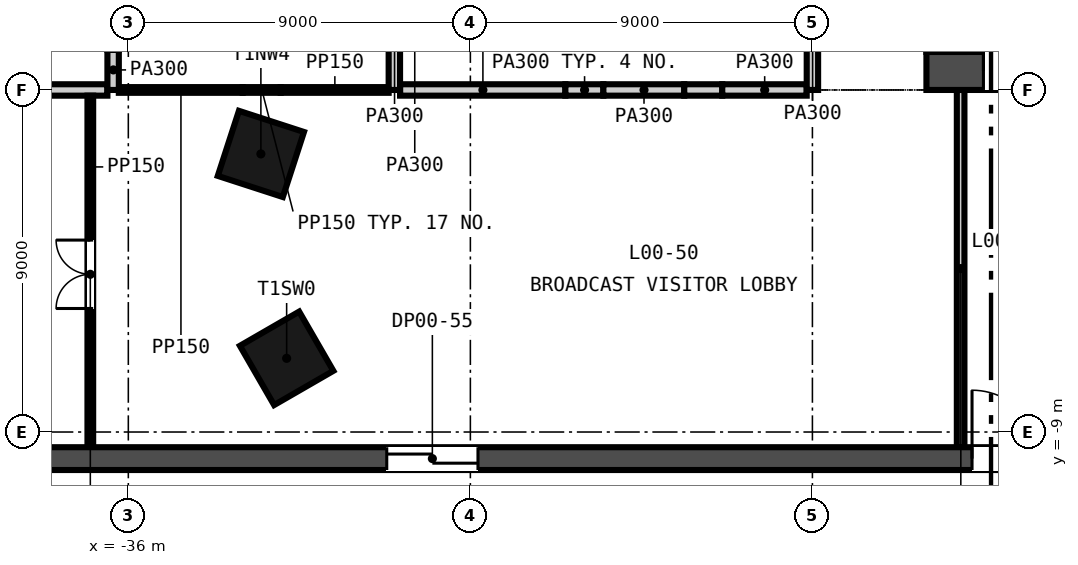
"""IFC4 building model, lengths in metres.
Left out: names, types, materials, properties, quantities, classifications, styles, units other than length and angle.
Written with IfcOpenShell. Run it as: python <this file> out.ifc"""

import sys

from ifc_helpers import new_model, si_unit, direction, frame, frame_2d, origin, origin_2d, place, context, subcontext, project, spatial, rectangle, extrude, element, fill, save


model = new_model("IFC4")
c1 = context("Model", 3, precision=1e-05, world=origin(), true_north=direction((0.0, 1.0)))
c2 = subcontext(c1, "Body", "Model", "MODEL_VIEW")
j1 = project(units=[si_unit("LENGTHUNIT", "METRE"), si_unit("PLANEANGLEUNIT", "RADIAN")], contexts=[c1])
p1 = place(None, origin())
s1 = spatial("IfcSite", under=j1, at=p1, CompositionType="ELEMENT")
p2 = place(p1, origin())
s2 = spatial("IfcBuilding", under=s1, at=p2, CompositionType="ELEMENT")
p3 = place(p2, origin())
s3 = spatial("IfcBuildingStorey", under=s2, at=p3, CompositionType="ELEMENT", Elevation=0.0)
p4 = place(p3, frame((-15.0, 0.5, -2.2), z_axis=(0.0, 0.0, 1.0), x_axis=(1.0, 0.0, 0.0)))
e1 = element("IfcWall", 1, at=p4, inside=s3, PredefinedType="SOLIDWALL", context=c2, shape_type="SweptSolid", body=[
    extrude(rectangle(XDim=30.0, YDim=1.0, at=frame_2d((15.0, 0.0))), origin(), (0.0, 0.0, 1.0), 10.8),
])
p5 = place(p4, frame((5.8, 0.0, 2.2)))
e2 = element("IfcOpeningElement", 2, at=p5, cuts=e1, PredefinedType="OPENING", context=c2, shape_type="SweptSolid", body=[
    extrude(rectangle(XDim=2.4, YDim=2.4, at=frame_2d((1.2, 1.2))), frame((0.0, 0.51, 0.0), z_axis=(0.0, -1.0, 0.0), x_axis=(1.0, 0.0, 0.0)), (0.0, 0.0, 1.0), 1.02),
])
p6 = place(p4, frame((13.8, 0.0, 2.2)))
e3 = element("IfcOpeningElement", 3, at=p6, cuts=e1, PredefinedType="OPENING", context=c2, shape_type="SweptSolid", body=[
    extrude(rectangle(XDim=2.4, YDim=2.4, at=frame_2d((1.2, 1.2))), frame((0.0, 0.51, 0.0), z_axis=(0.0, -1.0, 0.0), x_axis=(1.0, 0.0, 0.0)), (0.0, 0.0, 1.0), 1.02),
])
p7 = place(p4, frame((21.8, 0.0, 2.2)))
e4 = element("IfcOpeningElement", 4, at=p7, cuts=e1, PredefinedType="OPENING", context=c2, shape_type="SweptSolid", body=[
    extrude(rectangle(XDim=2.4, YDim=2.4, at=frame_2d((1.2, 1.2))), frame((0.0, 0.51, 0.0), z_axis=(0.0, -1.0, 0.0), x_axis=(1.0, 0.0, 0.0)), (0.0, 0.0, 1.0), 1.02),
])
p8 = place(p4, frame((1.5, 0.0, 2.2)))
e5 = element("IfcOpeningElement", 5, at=p8, cuts=e1, PredefinedType="OPENING", context=c2, shape_type="SweptSolid", body=[
    extrude(rectangle(XDim=1.2, YDim=2.1, at=frame_2d((0.6, 1.05))), frame((0.0, 0.51, 0.0), z_axis=(0.0, -1.0, 0.0), x_axis=(1.0, 0.0, 0.0)), (0.0, 0.0, 1.0), 1.02),
])
p9 = place(p4, frame((27.3, 0.0, 2.2)))
e6 = element("IfcOpeningElement", 6, at=p9, cuts=e1, PredefinedType="OPENING", context=c2, shape_type="SweptSolid", body=[
    extrude(rectangle(XDim=1.2, YDim=2.1, at=frame_2d((0.6, 1.05))), frame((0.0, 0.51, 0.0), z_axis=(0.0, -1.0, 0.0), x_axis=(1.0, 0.0, 0.0)), (0.0, 0.0, 1.0), 1.02),
])
for number, where, z_axis, x_axis in (
    (7, (-32.512, -1.683, -0.3), (0.0, 0.0, 1.0), (-0.309, -0.951, 0.0)),
    (8, (-31.834, -7.061, -0.3), (0.0, 0.0, 1.0), (0.5, -0.866, 0.0)),
):
    element("IfcColumn", number, at=place(p3, frame(where, z_axis=z_axis, x_axis=x_axis)), inside=s3, PredefinedType="COLUMN", context=c2, shape_type="SweptSolid", body=[
        extrude(rectangle(XDim=1.8, YDim=1.8, at=origin_2d()), origin(), (0.0, 0.0, 1.0), 8.9),
    ])
p10 = place(p3, frame((-52.0, -9.7, -0.3), z_axis=(0.0, 0.0, 1.0), x_axis=(1.0, 0.0, 0.0)))
e9 = element("IfcWall", 9, at=p10, inside=s3, PredefinedType="SOLIDWALL", context=c2, shape_type="SweptSolid", body=[
    extrude(rectangle(XDim=104.0, YDim=0.6, at=frame_2d((52.0, 0.0))), origin(), (0.0, 0.0, 1.0), 8.9),
])
p11 = place(p10, frame((67.4, 0.0, 0.3)))
e10 = element("IfcOpeningElement", 10, at=p11, cuts=e9, PredefinedType="OPENING", context=c2, shape_type="SweptSolid", body=[
    extrude(rectangle(XDim=1.2, YDim=2.1, at=frame_2d((0.6, 1.05))), frame((0.0, 0.31, 0.0), z_axis=(0.0, -1.0, 0.0), x_axis=(1.0, 0.0, 0.0)), (0.0, 0.0, 1.0), 0.62),
])
p12 = place(p10, frame((38.2, 0.0, 0.3)))
e11 = element("IfcOpeningElement", 11, at=p12, cuts=e9, PredefinedType="OPENING", context=c2, shape_type="SweptSolid", body=[
    extrude(rectangle(XDim=1.8, YDim=2.4, at=frame_2d((0.9, 1.2))), frame((0.0, 0.31, 0.0), z_axis=(0.0, -1.0, 0.0), x_axis=(1.0, 0.0, 0.0)), (0.0, 0.0, 1.0), 0.62),
])
p13 = place(p10, frame((64.0, 0.0, 0.3)))
e12 = element("IfcOpeningElement", 12, at=p13, cuts=e9, PredefinedType="OPENING", context=c2, shape_type="SweptSolid", body=[
    extrude(rectangle(XDim=1.8, YDim=2.4, at=frame_2d((0.9, 1.2))), frame((0.0, 0.31, 0.0), z_axis=(0.0, -1.0, 0.0), x_axis=(1.0, 0.0, 0.0)), (0.0, 0.0, 1.0), 0.62),
])
p14 = place(p10, frame((41.8, 0.0, 0.3)))
e13 = element("IfcOpeningElement", 13, at=p14, cuts=e9, PredefinedType="OPENING", context=c2, shape_type="SweptSolid", body=[
    extrude(rectangle(XDim=2.4, YDim=2.4, at=frame_2d((1.2, 1.2))), frame((0.0, 0.31, 0.0), z_axis=(0.0, -1.0, 0.0), x_axis=(1.0, 0.0, 0.0)), (0.0, 0.0, 1.0), 0.62),
])
p15 = place(p10, frame((59.8, 0.0, 0.3)))
e14 = element("IfcOpeningElement", 14, at=p15, cuts=e9, PredefinedType="OPENING", context=c2, shape_type="SweptSolid", body=[
    extrude(rectangle(XDim=2.4, YDim=2.4, at=frame_2d((1.2, 1.2))), frame((0.0, 0.31, 0.0), z_axis=(0.0, -1.0, 0.0), x_axis=(1.0, 0.0, 0.0)), (0.0, 0.0, 1.0), 0.62),
])
p16 = place(p10, frame((22.8, 0.0, 0.3)))
e15 = element("IfcOpeningElement", 15, at=p16, cuts=e9, PredefinedType="OPENING", context=c2, shape_type="SweptSolid", body=[
    extrude(rectangle(XDim=2.4, YDim=2.4, at=frame_2d((1.2, 1.2))), frame((0.0, 0.31, 0.0), z_axis=(0.0, -1.0, 0.0), x_axis=(1.0, 0.0, 0.0)), (0.0, 0.0, 1.0), 0.62),
])
p17 = place(p10, frame((78.8, 0.0, 0.3)))
e16 = element("IfcOpeningElement", 16, at=p17, cuts=e9, PredefinedType="OPENING", context=c2, shape_type="SweptSolid", body=[
    extrude(rectangle(XDim=2.4, YDim=2.4, at=frame_2d((1.2, 1.2))), frame((0.0, 0.31, 0.0), z_axis=(0.0, -1.0, 0.0), x_axis=(1.0, 0.0, 0.0)), (0.0, 0.0, 1.0), 0.62),
])
p18 = place(p10, frame((7.1, 0.0, 0.3)))
e17 = element("IfcOpeningElement", 17, at=p18, cuts=e9, PredefinedType="OPENING", context=c2, shape_type="SweptSolid", body=[
    extrude(rectangle(XDim=1.8, YDim=2.4, at=frame_2d((0.9, 1.2))), frame((0.0, 0.31, 0.0), z_axis=(0.0, -1.0, 0.0), x_axis=(1.0, 0.0, 0.0)), (0.0, 0.0, 1.0), 0.62),
])
p19 = place(p10, frame((95.1, 0.0, 0.3)))
e18 = element("IfcOpeningElement", 18, at=p19, cuts=e9, PredefinedType="OPENING", context=c2, shape_type="SweptSolid", body=[
    extrude(rectangle(XDim=1.8, YDim=2.4, at=frame_2d((0.9, 1.2))), frame((0.0, 0.31, 0.0), z_axis=(0.0, -1.0, 0.0), x_axis=(1.0, 0.0, 0.0)), (0.0, 0.0, 1.0), 0.62),
])
p20 = place(p3, frame((-51.0, 0.0, 0.0), z_axis=(0.0, 0.0, 1.0), x_axis=(1.0, 0.0, 0.0)))
e19 = element("IfcWall", 19, at=p20, inside=s3, PredefinedType="PARTITIONING", context=c2, shape_type="SweptSolid", body=[
    extrude(rectangle(XDim=14.45, YDim=0.3, at=frame_2d((7.225, 0.0))), origin(), (0.0, 0.0, 1.0), 8.6),
])
p21 = place(p3, frame((-36.25, 0.0, 0.0), z_axis=(0.0, 0.0, 1.0), x_axis=(1.0, 0.0, 0.0)))
e20 = element("IfcWall", 20, at=p21, inside=s3, PredefinedType="PARTITIONING", context=c2, shape_type="SweptSolid", body=[
    extrude(rectangle(XDim=3.259, YDim=0.15, at=frame_2d((1.629, 0.0))), origin(), (0.0, 0.0, 1.0), 8.6),
])
p22 = place(p3, frame((-32.991, 0.0, 0.0), z_axis=(0.0, 0.0, 1.0), x_axis=(1.0, 0.0, 0.0)))
e21 = element("IfcWall", 21, at=p22, inside=s3, PredefinedType="PARTITIONING", context=c2, shape_type="SweptSolid", body=[
    extrude(rectangle(XDim=1.0, YDim=0.15, at=frame_2d((0.5, 0.0))), origin(), (0.0, 0.0, 1.0), 7.6),
])
p23 = place(p3, frame((-31.991, 0.0, 0.0), z_axis=(0.0, 0.0, 1.0), x_axis=(1.0, 0.0, 0.0)))
e22 = element("IfcWall", 22, at=p23, inside=s3, PredefinedType="PARTITIONING", context=c2, shape_type="SweptSolid", body=[
    extrude(rectangle(XDim=2.841, YDim=0.15, at=frame_2d((1.42, 0.0))), origin(), (0.0, 0.0, 1.0), 8.6),
])
p24 = place(p3, frame((-28.85, 0.0, 0.0), z_axis=(0.0, 0.0, 1.0), x_axis=(1.0, 0.0, 0.0)))
e23 = element("IfcWall", 23, at=p24, inside=s3, PredefinedType="PARTITIONING", context=c2, shape_type="SweptSolid", body=[
    extrude(rectangle(XDim=4.35, YDim=0.3, at=frame_2d((2.175, 0.0))), origin(), (0.0, 0.0, 1.0), 8.6),
])
p25 = place(p3, frame((-24.5, 0.0, 0.0), z_axis=(0.0, 0.0, 1.0), x_axis=(1.0, 0.0, 0.0)))
e24 = element("IfcWall", 24, at=p25, inside=s3, PredefinedType="PARTITIONING", context=c2, shape_type="SweptSolid", body=[
    extrude(rectangle(XDim=1.0, YDim=0.3, at=frame_2d((0.5, 0.0))), origin(), (0.0, 0.0, 1.0), 7.765),
])
p26 = place(p3, frame((-23.5, 0.0, 0.0), z_axis=(0.0, 0.0, 1.0), x_axis=(1.0, 0.0, 0.0)))
e25 = element("IfcWall", 25, at=p26, inside=s3, PredefinedType="PARTITIONING", context=c2, shape_type="SweptSolid", body=[
    extrude(rectangle(XDim=2.128, YDim=0.3, at=frame_2d((1.064, 0.0))), origin(), (0.0, 0.0, 1.0), 8.6),
])
p27 = place(p3, frame((-21.372, 0.0, 0.0), z_axis=(0.0, 0.0, 1.0), x_axis=(1.0, 0.0, 0.0)))
e26 = element("IfcWall", 26, at=p27, inside=s3, PredefinedType="PARTITIONING", context=c2, shape_type="SweptSolid", body=[
    extrude(rectangle(XDim=1.0, YDim=0.3, at=frame_2d((0.5, 0.0))), origin(), (0.0, 0.0, 1.0), 7.765),
])
p28 = place(p3, frame((-20.372, 0.0, 0.0), z_axis=(0.0, 0.0, 1.0), x_axis=(1.0, 0.0, 0.0)))
e27 = element("IfcWall", 27, at=p28, inside=s3, PredefinedType="PARTITIONING", context=c2, shape_type="SweptSolid", body=[
    extrude(rectangle(XDim=2.222, YDim=0.3, at=frame_2d((1.111, 0.0))), origin(), (0.0, 0.0, 1.0), 8.6),
])
p29 = place(p3, frame((-37.0, -9.4, 0.0), z_axis=(0.0, 0.0, 1.0), x_axis=(0.0, 1.0, 0.0)))
e28 = element("IfcWall", 28, at=p29, inside=s3, PredefinedType="PARTITIONING", context=c2, shape_type="SweptSolid", body=[
    extrude(rectangle(XDim=9.25, YDim=0.15, at=frame_2d((4.625, 0.0))), origin(), (0.0, 0.0, 1.0), 8.6),
])
p30 = place(p29, frame((3.65, 0.0, 0.0)))
e29 = element("IfcOpeningElement", 29, at=p30, cuts=e28, PredefinedType="OPENING", context=c2, shape_type="SweptSolid", body=[
    extrude(rectangle(XDim=1.8, YDim=2.4, at=frame_2d((0.9, 1.2))), frame((0.0, 0.085, 0.0), z_axis=(0.0, -1.0, 0.0), x_axis=(1.0, 0.0, 0.0)), (0.0, 0.0, 1.0), 0.17),
])
p31 = place(p3, frame((-36.4, 0.0, 0.0), z_axis=(0.0, 0.0, 1.0), x_axis=(0.0, 1.0, 0.0)))
e30 = element("IfcWall", 30, at=p31, inside=s3, PredefinedType="PARTITIONING", context=c2, shape_type="SweptSolid", body=[
    extrude(rectangle(XDim=1.055, YDim=0.3, at=frame_2d((0.527, 0.0))), origin(), (0.0, 0.0, 1.0), 7.698),
])
p32 = place(p3, frame((-29.0, 0.0, 0.0), z_axis=(0.0, 0.0, 1.0), x_axis=(0.0, 1.0, 0.0)))
e31 = element("IfcWall", 31, at=p32, inside=s3, PredefinedType="PARTITIONING", context=c2, shape_type="SweptSolid", body=[
    extrude(rectangle(XDim=5.752, YDim=0.3, at=frame_2d((2.876, 0.0))), origin(), (0.0, 0.0, 1.0), 8.6),
])
p33 = place(p3, frame((-18.0, 0.0, 0.0), z_axis=(0.0, 0.0, 1.0), x_axis=(0.0, 1.0, 0.0)))
e32 = element("IfcWall", 32, at=p33, inside=s3, PredefinedType="PARTITIONING", context=c2, shape_type="SweptSolid", body=[
    extrude(rectangle(XDim=7.0, YDim=0.3, at=frame_2d((3.5, 0.0))), origin(), (0.0, 0.0, 1.0), 8.6),
])
p34 = place(p33, frame((2.4, 0.0, 0.0)))
e33 = element("IfcOpeningElement", 33, at=p34, cuts=e32, PredefinedType="OPENING", context=c2, shape_type="SweptSolid", body=[
    extrude(rectangle(XDim=2.4, YDim=2.4, at=frame_2d((1.2, 1.2))), frame((0.0, 0.16, 0.0), z_axis=(0.0, -1.0, 0.0), x_axis=(1.0, 0.0, 0.0)), (0.0, 0.0, 1.0), 0.32),
])
p35 = place(p3, frame((-14.1, -9.4, 0.0), z_axis=(0.0, 0.0, 1.0), x_axis=(0.0, 1.0, 0.0)))
e34 = element("IfcWall", 34, at=p35, inside=s3, PredefinedType="PARTITIONING", context=c2, shape_type="SweptSolid", body=[
    extrude(rectangle(XDim=9.4, YDim=0.2, at=frame_2d((4.7, 0.0))), origin(), (0.0, 0.0, 1.0), 8.6),
])
p36 = place(p8, origin())
e35 = element("IfcDoor", 35, at=p36, inside=s3, OperationType="SINGLE_SWING_LEFT", PredefinedType="DOOR", context=c2, shape_type="SweptSolid", body=[
    extrude(rectangle(XDim=1.2, YDim=2.1, at=frame_2d((0.6, 1.05))), frame((0.0, 0.025, 0.0), z_axis=(0.0, -1.0, 0.0), x_axis=(1.0, 0.0, 0.0)), (0.0, 0.0, 1.0), 0.05),
])
fill(e5, e35)
p37 = place(p30, origin())
e36 = element("IfcDoor", 36, at=p37, inside=s3, OperationType="SINGLE_SWING_LEFT", PredefinedType="DOOR", context=c2, shape_type="SweptSolid", body=[
    extrude(rectangle(XDim=1.8, YDim=2.4, at=frame_2d((0.9, 1.2))), frame((0.0, 0.025, 0.0), z_axis=(0.0, -1.0, 0.0), x_axis=(1.0, 0.0, 0.0)), (0.0, 0.0, 1.0), 0.05),
])
fill(e29, e36)
p38 = place(p12, frame((1.8, 0.0, 0.0), z_axis=(0.0, 0.0, 1.0), x_axis=(-1.0, 0.0, 0.0)))
e37 = element("IfcDoor", 37, at=p38, inside=s3, OperationType="SINGLE_SWING_LEFT", PredefinedType="DOOR", context=c2, shape_type="SweptSolid", body=[
    extrude(rectangle(XDim=1.8, YDim=2.4, at=frame_2d((0.9, 1.2))), frame((0.0, 0.025, 0.0), z_axis=(0.0, -1.0, 0.0), x_axis=(1.0, 0.0, 0.0)), (0.0, 0.0, 1.0), 0.05),
])
fill(e11, e37)
p39 = place(p16, frame((2.4, 0.0, 0.0), z_axis=(0.0, 0.0, 1.0), x_axis=(-1.0, 0.0, 0.0)))
e38 = element("IfcDoor", 38, at=p39, inside=s3, OperationType="SINGLE_SWING_LEFT", PredefinedType="DOOR", context=c2, shape_type="SweptSolid", body=[
    extrude(rectangle(XDim=2.4, YDim=2.4, at=frame_2d((1.2, 1.2))), frame((0.0, 0.025, 0.0), z_axis=(0.0, -1.0, 0.0), x_axis=(1.0, 0.0, 0.0)), (0.0, 0.0, 1.0), 0.05),
])
fill(e15, e38)
save(model, sys.argv[1])
